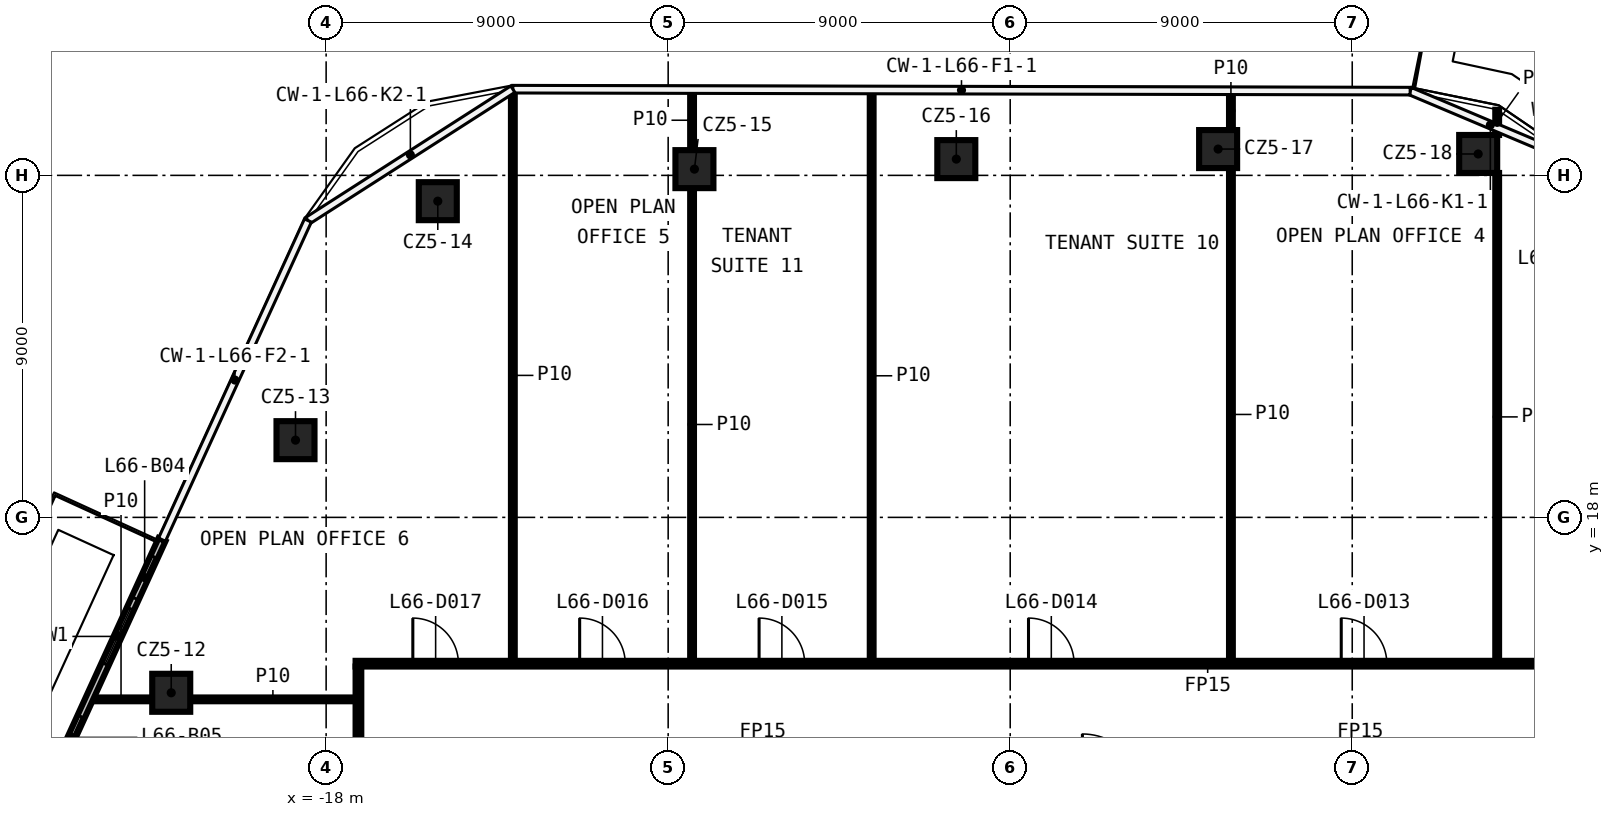
"""IFC4 building model, lengths in metres.
Left out: names, types, materials, properties, quantities, classifications, styles, units other than length and angle.
Written with IfcOpenShell. Run it as: python <this file> out.ifc"""

import sys

from ifc_helpers import new_model, si_unit, direction, frame, frame_2d, origin, origin_2d, place, context, subcontext, project, spatial, rectangle, extrude, element, fill, save


model = new_model("IFC4")
c1 = context("Model", 3, precision=1e-05, world=origin(), true_north=direction((0.0, 1.0)))
c2 = subcontext(c1, "Body", "Model", "MODEL_VIEW")
j1 = project(units=[si_unit("LENGTHUNIT", "METRE"), si_unit("PLANEANGLEUNIT", "RADIAN")], contexts=[c1])
p1 = place(None, origin())
s1 = spatial("IfcSite", under=j1, at=p1, CompositionType="ELEMENT")
p2 = place(p1, origin())
s2 = spatial("IfcBuilding", under=s1, at=p2, CompositionType="ELEMENT")
p3 = place(p2, frame((0.0, 0.0, 311.0)))
s3 = spatial("IfcBuildingStorey", under=s2, at=p3, CompositionType="ELEMENT", Elevation=311.0)
for number, where, z_axis, x_axis in (
    (1, (-22.076, 13.384, 0.0), (0.0, 0.0, 1.0), (1.0, 0.0, 0.0)),
    (2, (-18.806, 20.032, 0.0), (0.0, 0.0, 1.0), (1.0, 0.0, 0.0)),
    (3, (-15.062, 26.321, 0.0), (0.0, 0.0, 1.0), (1.0, 0.0, 0.0)),
    (4, (-8.309, 27.164, 0.0), (0.0, 0.0, 1.0), (1.0, 0.0, 0.0)),
    (5, (-1.418, 27.428, 0.0), (0.0, 0.0, 1.0), (1.0, 0.0, 0.0)),
    (6, (5.471, 27.692, 0.0), (0.0, 0.0, 1.0), (1.0, 0.0, 0.0)),
    (7, (12.314, 27.563, 0.0), (0.0, 0.0, 1.0), (1.0, 0.0, 0.0)),
):
    element("IfcColumn", number, at=place(p3, frame(where, z_axis=z_axis, x_axis=x_axis)), inside=s3, PredefinedType="COLUMN", context=c2, shape_type="SweptSolid", body=[
        extrude(rectangle(XDim=1.0, YDim=1.0, at=origin_2d()), origin(), (0.0, 0.0, 1.0), 3.82),
    ])
p4 = place(p3, frame((-24.218, 13.211, 0.0), z_axis=(0.0, 0.0, 1.0), x_axis=(1.0, 0.0, 0.0)))
e8 = element("IfcWall", 8, at=p4, inside=s3, PredefinedType="PARTITIONING", context=c2, shape_type="SweptSolid", body=[
    extrude(rectangle(XDim=1.642, YDim=0.1, at=frame_2d((0.821, 0.0))), origin(), (0.0, 0.0, 1.0), 3.82),
])
p5 = place(p3, frame((-21.576, 13.211, 0.0), z_axis=(0.0, 0.0, 1.0), x_axis=(1.0, 0.0, 0.0)))
e9 = element("IfcWall", 9, at=p5, inside=s3, PredefinedType="PARTITIONING", context=c2, shape_type="SweptSolid", body=[
    extrude(rectangle(XDim=4.351, YDim=0.1, at=frame_2d((2.175, 0.0))), origin(), (0.0, 0.0, 1.0), 3.82),
])
p6 = place(p3, frame((-17.225, 14.15, 0.0), z_axis=(0.0, 0.0, 1.0), x_axis=(1.0, 0.0, 0.0)))
e10 = element("IfcWall", 10, at=p6, inside=s3, PredefinedType="PARTITIONING", context=c2, shape_type="SweptSolid", body=[
    extrude(rectangle(XDim=34.45, YDim=0.15, at=frame_2d((17.225, 0.0))), origin(), (0.0, 0.0, 1.0), 3.82),
])
p7 = place(p6, frame((31.607, 0.0, 0.0)))
e11 = element("IfcOpeningElement", 11, at=p7, cuts=e10, PredefinedType="OPENING", context=c2, shape_type="SweptSolid", body=[
    extrude(rectangle(XDim=1.2, YDim=2.1, at=frame_2d((0.6, 1.05))), frame((0.0, 0.085, 0.0), z_axis=(0.0, -1.0, 0.0), x_axis=(1.0, 0.0, 0.0)), (0.0, 0.0, 1.0), 0.17),
])
p8 = place(p6, frame((25.936, 0.0, 0.0)))
e12 = element("IfcOpeningElement", 12, at=p8, cuts=e10, PredefinedType="OPENING", context=c2, shape_type="SweptSolid", body=[
    extrude(rectangle(XDim=1.2, YDim=2.1, at=frame_2d((0.6, 1.05))), frame((0.0, 0.085, 0.0), z_axis=(0.0, -1.0, 0.0), x_axis=(1.0, 0.0, 0.0)), (0.0, 0.0, 1.0), 0.17),
])
p9 = place(p6, frame((17.707, 0.0, 0.0)))
e13 = element("IfcOpeningElement", 13, at=p9, cuts=e10, PredefinedType="OPENING", context=c2, shape_type="SweptSolid", body=[
    extrude(rectangle(XDim=1.2, YDim=2.1, at=frame_2d((0.6, 1.05))), frame((0.0, 0.085, 0.0), z_axis=(0.0, -1.0, 0.0), x_axis=(1.0, 0.0, 0.0)), (0.0, 0.0, 1.0), 0.17),
])
p10 = place(p6, frame((10.617, 0.0, 0.0)))
e14 = element("IfcOpeningElement", 14, at=p10, cuts=e10, PredefinedType="OPENING", context=c2, shape_type="SweptSolid", body=[
    extrude(rectangle(XDim=1.2, YDim=2.1, at=frame_2d((0.6, 1.05))), frame((0.0, 0.085, 0.0), z_axis=(0.0, -1.0, 0.0), x_axis=(1.0, 0.0, 0.0)), (0.0, 0.0, 1.0), 0.17),
])
p11 = place(p6, frame((5.896, 0.0, 0.0)))
e15 = element("IfcOpeningElement", 15, at=p11, cuts=e10, PredefinedType="OPENING", context=c2, shape_type="SweptSolid", body=[
    extrude(rectangle(XDim=1.2, YDim=2.1, at=frame_2d((0.6, 1.05))), frame((0.0, 0.085, 0.0), z_axis=(0.0, -1.0, 0.0), x_axis=(1.0, 0.0, 0.0)), (0.0, 0.0, 1.0), 0.17),
])
p12 = place(p6, frame((1.506, 0.0, 0.0)))
e16 = element("IfcOpeningElement", 16, at=p12, cuts=e10, PredefinedType="OPENING", context=c2, shape_type="SweptSolid", body=[
    extrude(rectangle(XDim=1.2, YDim=2.1, at=frame_2d((0.6, 1.05))), frame((0.0, 0.085, 0.0), z_axis=(0.0, -1.0, 0.0), x_axis=(1.0, 0.0, 0.0)), (0.0, 0.0, 1.0), 0.17),
])
p13 = place(p3, frame((12.814, 14.225, 0.0), z_axis=(0.0, 0.0, 1.0), x_axis=(0.0, 1.0, 0.0)))
e17 = element("IfcWall", 17, at=p13, inside=s3, PredefinedType="PARTITIONING", context=c2, shape_type="SweptSolid", body=[
    extrude(rectangle(XDim=12.838, YDim=0.1, at=frame_2d((6.419, 0.0))), origin(), (0.0, 0.0, 1.0), 3.82),
])
p14 = place(p3, frame((12.814, 28.063, 0.0), z_axis=(0.0, 0.0, 1.0), x_axis=(0.0, 1.0, 0.0)))
e18 = element("IfcWall", 18, at=p14, inside=s3, PredefinedType="PARTITIONING", context=c2, shape_type="SweptSolid", body=[
    extrude(rectangle(XDim=0.664, YDim=0.1, at=frame_2d((0.332, 0.0))), origin(), (0.0, 0.0, 1.0), 3.82),
])
p15 = place(p3, frame((5.808, 14.225, 0.0), z_axis=(0.0, 0.0, 1.0), x_axis=(0.0, 1.0, 0.0)))
e19 = element("IfcWall", 19, at=p15, inside=s3, PredefinedType="PARTITIONING", context=c2, shape_type="SweptSolid", body=[
    extrude(rectangle(XDim=12.967, YDim=0.1, at=frame_2d((6.483, 0.0))), origin(), (0.0, 0.0, 1.0), 3.82),
])
p16 = place(p3, frame((5.808, 28.192, 0.0), z_axis=(0.0, 0.0, 1.0), x_axis=(0.0, 1.0, 0.0)))
e20 = element("IfcWall", 20, at=p16, inside=s3, PredefinedType="PARTITIONING", context=c2, shape_type="SweptSolid", body=[
    extrude(rectangle(XDim=1.015, YDim=0.1, at=frame_2d((0.507, 0.0))), origin(), (0.0, 0.0, 1.0), 3.82),
])
p17 = place(p3, frame((-3.645, 14.225, 0.0), z_axis=(0.0, 0.0, 1.0), x_axis=(0.0, 1.0, 0.0)))
e21 = element("IfcWall", 21, at=p17, inside=s3, PredefinedType="PARTITIONING", context=c2, shape_type="SweptSolid", body=[
    extrude(rectangle(XDim=15.002, YDim=0.1, at=frame_2d((7.501, 0.0))), origin(), (0.0, 0.0, 1.0), 3.82),
])
p18 = place(p3, frame((-8.371, 14.225, 0.0), z_axis=(0.0, 0.0, 1.0), x_axis=(0.0, 1.0, 0.0)))
e22 = element("IfcWall", 22, at=p18, inside=s3, PredefinedType="PARTITIONING", context=c2, shape_type="SweptSolid", body=[
    extrude(rectangle(XDim=12.439, YDim=0.1, at=frame_2d((6.219, 0.0))), origin(), (0.0, 0.0, 1.0), 3.82),
])
p19 = place(p3, frame((-8.371, 27.664, 0.0), z_axis=(0.0, 0.0, 1.0), x_axis=(0.0, 1.0, 0.0)))
e23 = element("IfcWall", 23, at=p19, inside=s3, PredefinedType="PARTITIONING", context=c2, shape_type="SweptSolid", body=[
    extrude(rectangle(XDim=1.574, YDim=0.1, at=frame_2d((0.787, 0.0))), origin(), (0.0, 0.0, 1.0), 3.82),
])
p20 = place(p3, frame((-13.087, 14.225, 0.0), z_axis=(0.0, 0.0, 1.0), x_axis=(0.0, 1.0, 0.0)))
e24 = element("IfcWall", 24, at=p20, inside=s3, PredefinedType="PARTITIONING", context=c2, shape_type="SweptSolid", body=[
    extrude(rectangle(XDim=15.023, YDim=0.1, at=frame_2d((7.511, 0.0))), origin(), (0.0, 0.0, 1.0), 3.82),
])
p21 = place(p3, frame((-17.15, -14.075, 0.0), z_axis=(0.0, 0.0, 1.0), x_axis=(0.0, 1.0, 0.0)))
e25 = element("IfcWall", 25, at=p21, inside=s3, PredefinedType="PARTITIONING", context=c2, shape_type="SweptSolid", body=[
    extrude(rectangle(XDim=28.15, YDim=0.15, at=frame_2d((14.075, 0.0))), origin(), (0.0, 0.0, 1.0), 3.82),
])
p22 = place(p21, frame((10.867, 0.0, 0.0)))
e26 = element("IfcOpeningElement", 26, at=p22, cuts=e25, PredefinedType="OPENING", context=c2, shape_type="SweptSolid", body=[
    extrude(rectangle(XDim=1.2, YDim=2.1, at=frame_2d((0.6, 1.05))), frame((0.0, 0.085, 0.0), z_axis=(0.0, -1.0, 0.0), x_axis=(1.0, 0.0, 0.0)), (0.0, 0.0, 1.0), 0.17),
])
p23 = place(p21, frame((3.801, 0.0, 0.0)))
e27 = element("IfcOpeningElement", 27, at=p23, cuts=e25, PredefinedType="OPENING", context=c2, shape_type="SweptSolid", body=[
    extrude(rectangle(XDim=1.2, YDim=2.1, at=frame_2d((0.6, 1.05))), frame((0.0, 0.085, 0.0), z_axis=(0.0, -1.0, 0.0), x_axis=(1.0, 0.0, 0.0)), (0.0, 0.0, 1.0), 0.17),
])
p24 = place(p21, frame((18.279, 0.0, 0.0)))
e28 = element("IfcOpeningElement", 28, at=p24, cuts=e25, PredefinedType="OPENING", context=c2, shape_type="SweptSolid", body=[
    extrude(rectangle(XDim=1.2, YDim=2.1, at=frame_2d((0.6, 1.05))), frame((0.0, 0.085, 0.0), z_axis=(0.0, -1.0, 0.0), x_axis=(1.0, 0.0, 0.0)), (0.0, 0.0, 1.0), 0.17),
])
p25 = place(p3, frame((-22.318, 17.414, 0.0), z_axis=(0.0, 0.0, 1.0), x_axis=(-0.415710447513, -0.909497016943, 0.0)))
e29 = element("IfcWall", 29, at=p25, inside=s3, PredefinedType="SOLIDWALL", context=c2, shape_type="SweptSolid", body=[
    extrude(rectangle(XDim=18.487, YDim=0.2, at=frame_2d((9.243, 0.0))), origin(), (0.0, 0.0, 1.0), 3.82),
])
p26 = place(p25, frame((2.0, 0.0, 0.6)))
e30 = element("IfcOpeningElement", 30, at=p26, cuts=e29, PredefinedType="OPENING", context=c2, shape_type="SweptSolid", body=[
    extrude(rectangle(XDim=1.6, YDim=2.4, at=frame_2d((0.8, 1.2))), frame((0.0, 0.11, 0.0), z_axis=(0.0, -1.0, 0.0), x_axis=(1.0, 0.0, 0.0)), (0.0, 0.0, 1.0), 0.22),
])
p27 = place(p25, frame((0.5, 0.0, 0.0)))
e31 = element("IfcOpeningElement", 31, at=p27, cuts=e29, PredefinedType="OPENING", context=c2, shape_type="SweptSolid", body=[
    extrude(rectangle(XDim=1.2, YDim=2.4, at=frame_2d((0.6, 1.2))), frame((0.0, 0.11, 0.0), z_axis=(0.0, -1.0, 0.0), x_axis=(1.0, 0.0, 0.0)), (0.0, 0.0, 1.0), 0.22),
])
p28 = place(p25, frame((6.622, 0.0, 0.6)))
e32 = element("IfcOpeningElement", 32, at=p28, cuts=e29, PredefinedType="OPENING", context=c2, shape_type="SweptSolid", body=[
    extrude(rectangle(XDim=1.6, YDim=2.4, at=frame_2d((0.8, 1.2))), frame((0.0, 0.11, 0.0), z_axis=(0.0, -1.0, 0.0), x_axis=(1.0, 0.0, 0.0)), (0.0, 0.0, 1.0), 0.22),
])
p29 = place(p25, frame((5.122, 0.0, 0.0)))
e33 = element("IfcOpeningElement", 33, at=p29, cuts=e29, PredefinedType="OPENING", context=c2, shape_type="SweptSolid", body=[
    extrude(rectangle(XDim=1.2, YDim=2.4, at=frame_2d((0.6, 1.2))), frame((0.0, 0.11, 0.0), z_axis=(0.0, -1.0, 0.0), x_axis=(1.0, 0.0, 0.0)), (0.0, 0.0, 1.0), 0.22),
])
p30 = place(p25, frame((9.743, 0.0, 0.6)))
e34 = element("IfcOpeningElement", 34, at=p30, cuts=e29, PredefinedType="OPENING", context=c2, shape_type="SweptSolid", body=[
    extrude(rectangle(XDim=1.6, YDim=2.4, at=frame_2d((0.8, 1.2))), frame((0.0, 0.11, 0.0), z_axis=(0.0, -1.0, 0.0), x_axis=(1.0, 0.0, 0.0)), (0.0, 0.0, 1.0), 0.22),
])
p31 = place(p25, frame((11.643, 0.0, 0.0)))
e35 = element("IfcOpeningElement", 35, at=p31, cuts=e29, PredefinedType="OPENING", context=c2, shape_type="SweptSolid", body=[
    extrude(rectangle(XDim=1.2, YDim=2.4, at=frame_2d((0.6, 1.2))), frame((0.0, 0.11, 0.0), z_axis=(0.0, -1.0, 0.0), x_axis=(1.0, 0.0, 0.0)), (0.0, 0.0, 1.0), 0.22),
])
p32 = place(p25, frame((15.865, 0.0, 0.6)))
e36 = element("IfcOpeningElement", 36, at=p32, cuts=e29, PredefinedType="OPENING", context=c2, shape_type="SweptSolid", body=[
    extrude(rectangle(XDim=1.6, YDim=2.4, at=frame_2d((0.8, 1.2))), frame((0.0, 0.11, 0.0), z_axis=(0.0, -1.0, 0.0), x_axis=(1.0, 0.0, 0.0)), (0.0, 0.0, 1.0), 0.22),
])
p33 = place(p25, frame((14.365, 0.0, 0.0)))
e37 = element("IfcOpeningElement", 37, at=p33, cuts=e29, PredefinedType="OPENING", context=c2, shape_type="SweptSolid", body=[
    extrude(rectangle(XDim=1.2, YDim=2.4, at=frame_2d((0.6, 1.2))), frame((0.0, 0.11, 0.0), z_axis=(0.0, -1.0, 0.0), x_axis=(1.0, 0.0, 0.0)), (0.0, 0.0, 1.0), 0.22),
])
p34 = place(p8, origin())
e38 = element("IfcDoor", 38, at=p34, inside=s3, OperationType="SINGLE_SWING_RIGHT", PredefinedType="DOOR", context=c2, shape_type="SweptSolid", body=[
    extrude(rectangle(XDim=1.2, YDim=2.1, at=frame_2d((0.6, 1.05))), frame((0.0, 0.025, 0.0), z_axis=(0.0, -1.0, 0.0), x_axis=(1.0, 0.0, 0.0)), (0.0, 0.0, 1.0), 0.05),
])
fill(e12, e38)
p35 = place(p9, origin())
e39 = element("IfcDoor", 39, at=p35, inside=s3, OperationType="SINGLE_SWING_LEFT", PredefinedType="DOOR", context=c2, shape_type="SweptSolid", body=[
    extrude(rectangle(XDim=1.2, YDim=2.1, at=frame_2d((0.6, 1.05))), frame((0.0, 0.025, 0.0), z_axis=(0.0, -1.0, 0.0), x_axis=(1.0, 0.0, 0.0)), (0.0, 0.0, 1.0), 0.05),
])
fill(e13, e39)
p36 = place(p10, origin())
e40 = element("IfcDoor", 40, at=p36, inside=s3, OperationType="SINGLE_SWING_RIGHT", PredefinedType="DOOR", context=c2, shape_type="SweptSolid", body=[
    extrude(rectangle(XDim=1.2, YDim=2.1, at=frame_2d((0.6, 1.05))), frame((0.0, 0.025, 0.0), z_axis=(0.0, -1.0, 0.0), x_axis=(1.0, 0.0, 0.0)), (0.0, 0.0, 1.0), 0.05),
])
fill(e14, e40)
p37 = place(p11, origin())
e41 = element("IfcDoor", 41, at=p37, inside=s3, OperationType="SINGLE_SWING_LEFT", PredefinedType="DOOR", context=c2, shape_type="SweptSolid", body=[
    extrude(rectangle(XDim=1.2, YDim=2.1, at=frame_2d((0.6, 1.05))), frame((0.0, 0.025, 0.0), z_axis=(0.0, -1.0, 0.0), x_axis=(1.0, 0.0, 0.0)), (0.0, 0.0, 1.0), 0.05),
])
fill(e15, e41)
p38 = place(p12, origin())
e42 = element("IfcDoor", 42, at=p38, inside=s3, OperationType="SINGLE_SWING_RIGHT", PredefinedType="DOOR", context=c2, shape_type="SweptSolid", body=[
    extrude(rectangle(XDim=1.2, YDim=2.1, at=frame_2d((0.6, 1.05))), frame((0.0, 0.025, 0.0), z_axis=(0.0, -1.0, 0.0), x_axis=(1.0, 0.0, 0.0)), (0.0, 0.0, 1.0), 0.05),
])
fill(e16, e42)
p39 = place(p26, origin())
e43 = element("IfcWindow", 43, at=p39, inside=s3, PartitioningType="SINGLE_PANEL", PredefinedType="WINDOW", context=c2, shape_type="SweptSolid", body=[
    extrude(rectangle(XDim=1.6, YDim=2.4, at=frame_2d((0.8, 1.2))), frame((0.0, 0.03, 0.0), z_axis=(0.0, -1.0, 0.0), x_axis=(1.0, 0.0, 0.0)), (0.0, 0.0, 1.0), 0.06),
])
fill(e30, e43)
p40 = place(p27, origin())
e44 = element("IfcDoor", 44, at=p40, inside=s3, OperationType="SLIDING_TO_LEFT", PredefinedType="DOOR", context=c2, shape_type="SweptSolid", body=[
    extrude(rectangle(XDim=1.2, YDim=2.4, at=frame_2d((0.6, 1.2))), frame((0.0, 0.025, 0.0), z_axis=(0.0, -1.0, 0.0), x_axis=(1.0, 0.0, 0.0)), (0.0, 0.0, 1.0), 0.05),
])
fill(e31, e44)
p41 = place(p29, origin())
e45 = element("IfcDoor", 45, at=p41, inside=s3, OperationType="SLIDING_TO_LEFT", PredefinedType="DOOR", context=c2, shape_type="SweptSolid", body=[
    extrude(rectangle(XDim=1.2, YDim=2.4, at=frame_2d((0.6, 1.2))), frame((0.0, 0.025, 0.0), z_axis=(0.0, -1.0, 0.0), x_axis=(1.0, 0.0, 0.0)), (0.0, 0.0, 1.0), 0.05),
])
fill(e33, e45)
save(model, sys.argv[1])
